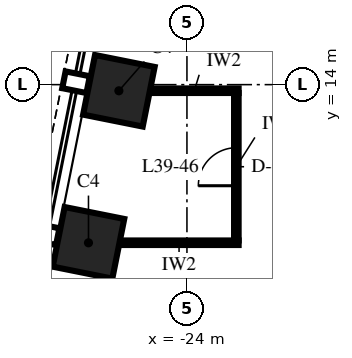
"""IFC4 building model, lengths in metres.
Left out: names, types, materials, properties, quantities, classifications, styles, units other than length and angle.
Written with IfcOpenShell. Run it as: python <this file> out.ifc"""

import sys

from ifc_helpers import new_model, si_unit, direction, frame, frame_2d, origin, origin_2d, place, context, subcontext, project, spatial, rectangle, extrude, element, fill, save


model = new_model("IFC4")
c1 = context("Model", 3, precision=1e-05, world=origin(), true_north=direction((0.0, 1.0)))
c2 = subcontext(c1, "Body", "Model", "MODEL_VIEW")
j1 = project(units=[si_unit("LENGTHUNIT", "METRE"), si_unit("PLANEANGLEUNIT", "RADIAN")], contexts=[c1])
p1 = place(None, origin())
s1 = spatial("IfcSite", under=j1, at=p1, CompositionType="ELEMENT")
p2 = place(p1, origin())
s2 = spatial("IfcBuilding", under=s1, at=p2, CompositionType="ELEMENT")
p3 = place(p2, frame((0.0, 0.0, 173.0)))
s3 = spatial("IfcBuildingStorey", under=s2, at=p3, CompositionType="ELEMENT", Elevation=173.0)
for number, where, z_axis, x_axis in (
    (1, (-25.791, 13.838, 0.0), (0.0, 0.0, 1.0), (-0.196, -0.981, 0.0)),
    (2, (-26.591, 9.838, 0.0), (0.0, 0.0, 1.0), (-0.196, -0.981, 0.0)),
):
    element("IfcColumn", number, at=place(p3, frame(where, z_axis=z_axis, x_axis=x_axis)), inside=s3, PredefinedType="COLUMN", context=c2, shape_type="SweptSolid", body=[
        extrude(rectangle(XDim=1.6, YDim=1.6, at=origin_2d()), origin(), (0.0, 0.0, 1.0), 5.0),
    ])
p4 = place(p3, frame((-25.775, 9.84, 0.0), z_axis=(0.0, 0.0, 1.0), x_axis=(1.0, 0.0, 0.0)))
e3 = element("IfcWall", 3, at=p4, inside=s3, PredefinedType="PARTITIONING", context=c2, shape_type="SweptSolid", body=[
    extrude(rectangle(XDim=3.135, YDim=0.12, at=frame_2d((1.567, 0.0))), origin(), (0.0, 0.0, 1.0), 4.25),
])
p5 = place(p3, frame((-24.975, 13.84, 0.0), z_axis=(0.0, 0.0, 1.0), x_axis=(1.0, 0.0, 0.0)))
e4 = element("IfcWall", 4, at=p5, inside=s3, PredefinedType="PARTITIONING", context=c2, shape_type="SweptSolid", body=[
    extrude(rectangle(XDim=2.335, YDim=0.12, at=frame_2d((1.167, 0.0))), origin(), (0.0, 0.0, 1.0), 4.25),
])
p6 = place(p3, frame((-22.7, 9.9, 0.0), z_axis=(0.0, 0.0, 1.0), x_axis=(0.0, 1.0, 0.0)))
e5 = element("IfcWall", 5, at=p6, inside=s3, PredefinedType="PARTITIONING", context=c2, shape_type="SweptSolid", body=[
    extrude(rectangle(XDim=3.88, YDim=0.12, at=frame_2d((1.94, 0.0))), origin(), (0.0, 0.0, 1.0), 4.85),
])
p7 = place(p6, frame((1.44, 0.0, 0.0)))
e6 = element("IfcOpeningElement", 6, at=p7, cuts=e5, PredefinedType="OPENING", context=c2, shape_type="SweptSolid", body=[
    extrude(rectangle(XDim=1.0, YDim=2.4, at=frame_2d((0.5, 1.2))), frame((0.0, 0.075, 0.0), z_axis=(0.0, -1.0, 0.0), x_axis=(1.0, 0.0, 0.0)), (0.0, 0.0, 1.0), 0.15),
])
p8 = place(p7, origin())
e7 = element("IfcDoor", 7, at=p8, inside=s3, OperationType="SINGLE_SWING_RIGHT", PredefinedType="DOOR", context=c2, shape_type="SweptSolid", body=[
    extrude(rectangle(XDim=1.0, YDim=2.4, at=frame_2d((0.5, 1.2))), frame((0.0, 0.06, 0.0), z_axis=(0.0, -1.0, 0.0), x_axis=(1.0, 0.0, 0.0)), (0.0, 0.0, 1.0), 0.12),
])
fill(e6, e7)
save(model, sys.argv[1])
